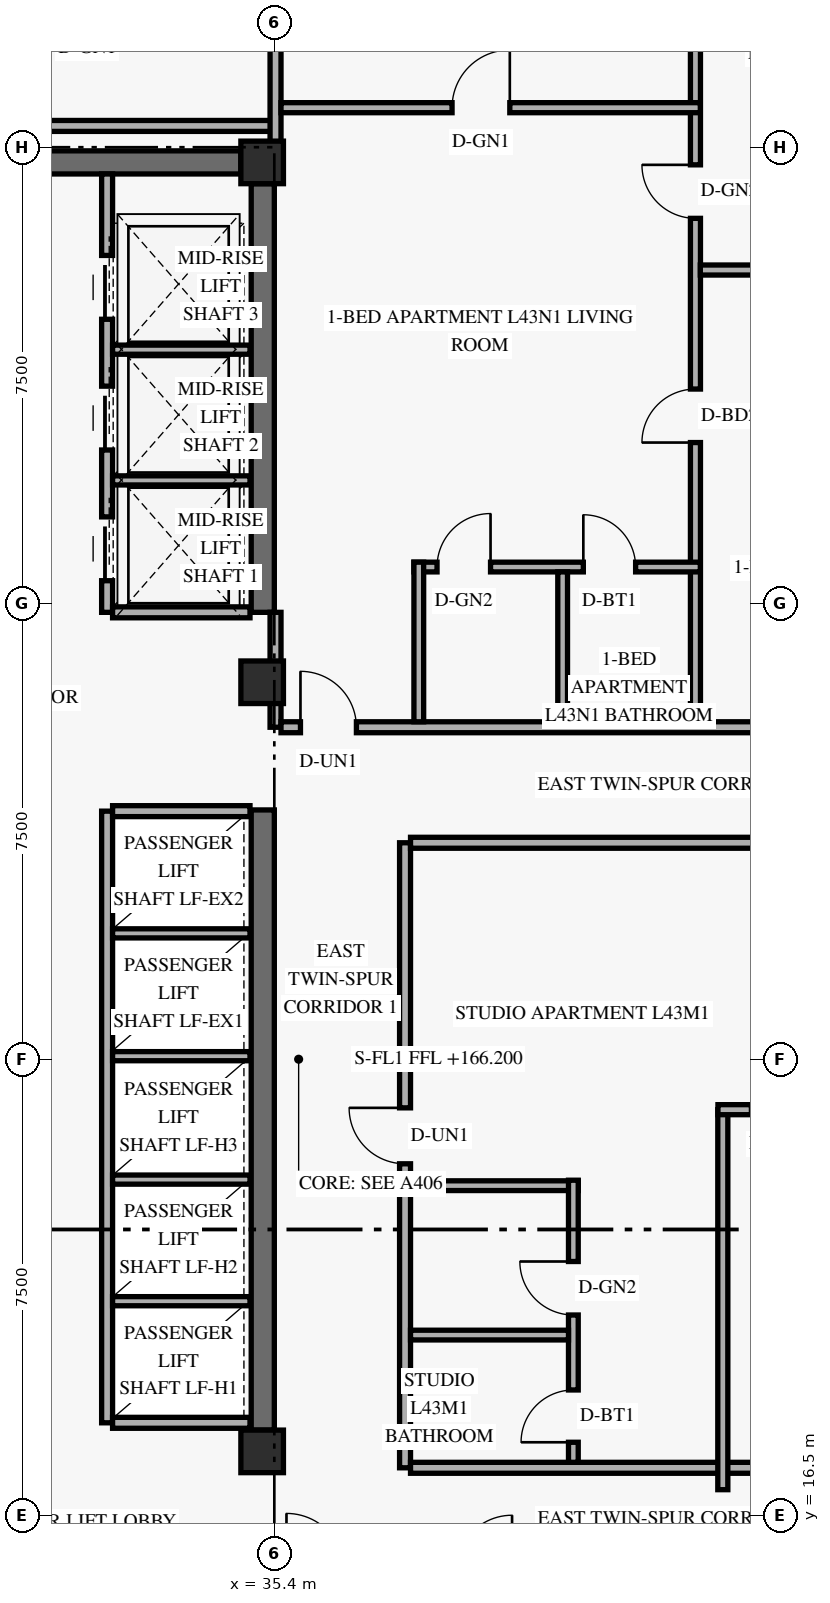
"""IFC4 building model, lengths in metres.
Left out: names, types, materials, properties, quantities, classifications, styles, units other than length and angle.
Written with IfcOpenShell. Run it as: python <this file> out.ifc"""

import sys

from ifc_helpers import new_model, si_unit, direction, frame, frame_2d, origin, origin_2d, place, context, subcontext, project, spatial, rectangle, extrude, element, fill, save


model = new_model("IFC4")
c1 = context("Model", 3, precision=1e-05, world=origin(), true_north=direction((0.0, 1.0)))
c2 = subcontext(c1, "Body", "Model", "MODEL_VIEW")
j1 = project(units=[si_unit("LENGTHUNIT", "METRE"), si_unit("PLANEANGLEUNIT", "RADIAN")], contexts=[c1])
p1 = place(None, origin())
s1 = spatial("IfcSite", under=j1, at=p1, CompositionType="ELEMENT")
p2 = place(p1, origin())
s2 = spatial("IfcBuilding", under=s1, at=p2, CompositionType="ELEMENT")
p3 = place(p2, frame((0.0, 0.0, 166.2)))
s3 = spatial("IfcBuildingStorey", under=s2, at=p3, CompositionType="ELEMENT", Elevation=166.2)
p4 = place(p3, frame((35.21, 17.9, 0.0), z_axis=(0.0, 0.0, 1.0), x_axis=(0.0, 1.0, 0.0)))
e1 = element("IfcWall", 1, at=p4, inside=s3, PredefinedType="SHEAR", context=c2, shape_type="SweptSolid", body=[
    extrude(rectangle(XDim=10.2, YDim=0.38, at=frame_2d((5.1, 0.0))), origin(), (0.0, 0.0, 1.0), 2.748),
])
p5 = place(p3, frame((35.21, 31.35, 0.0), z_axis=(0.0, 0.0, 1.0), x_axis=(0.0, 1.0, 0.0)))
e2 = element("IfcWall", 2, at=p5, inside=s3, PredefinedType="SHEAR", context=c2, shape_type="SweptSolid", body=[
    extrude(rectangle(XDim=7.05, YDim=0.38, at=frame_2d((3.525, 0.0))), origin(), (0.0, 0.0, 1.0), 2.748),
])
p6 = place(p3, frame((24.55, 38.75, 0.0), z_axis=(0.0, 0.0, 1.0), x_axis=(1.0, 0.0, 0.0)))
e3 = element("IfcWall", 3, at=p6, inside=s3, PredefinedType="SHEAR", context=c2, shape_type="SweptSolid", body=[
    extrude(rectangle(XDim=10.3, YDim=0.38, at=frame_2d((5.15, 0.0))), origin(), (0.0, 0.0, 1.0), 3.36),
])
p7 = place(p6, frame((5.2, 0.0, 0.0)))
e4 = element("IfcOpeningElement", 4, at=p7, cuts=e3, PredefinedType="OPENING", context=c2, shape_type="SweptSolid", body=[
    extrude(rectangle(XDim=1.05, YDim=2.15, at=frame_2d((0.525, 1.075))), frame((0.0, 0.2, 0.0), z_axis=(0.0, -1.0, 0.0), x_axis=(1.0, 0.0, 0.0)), (0.0, 0.0, 1.0), 0.4),
])
for number, where, z_axis, x_axis in (
    (5, (35.2, 17.55, 0.0), (0.0, 0.0, 1.0), (1.0, 0.0, 0.0)),
    (6, (35.2, 30.2, 0.0), (0.0, 0.0, 1.0), (1.0, 0.0, 0.0)),
    (7, (35.2, 38.75, 0.0), (0.0, 0.0, 1.0), (1.0, 0.0, 0.0)),
):
    element("IfcColumn", number, at=place(p3, frame(where, z_axis=z_axis, x_axis=x_axis)), inside=s3, PredefinedType="COLUMN", context=c2, shape_type="SweptSolid", body=[
        extrude(rectangle(XDim=0.7, YDim=0.7, at=origin_2d()), origin(), (0.0, 0.0, 1.0), 3.6),
    ])
p8 = place(p3, frame((32.65, 18.02, 0.0), z_axis=(0.0, 0.0, 1.0), x_axis=(0.0, 1.0, 0.0)))
e8 = element("IfcWall", 8, at=p8, inside=s3, PredefinedType="STANDARD", context=c2, shape_type="SweptSolid", body=[
    extrude(rectangle(XDim=10.06, YDim=0.18, at=frame_2d((5.03, 0.0))), origin(), (0.0, 0.0, 1.0), 3.36),
])
for number, where, z_axis, x_axis in (
    (9, (32.74, 18.02, 0.0), (0.0, 0.0, 1.0), (1.0, 0.0, 0.0)),
    (10, (32.74, 28.08, 0.0), (0.0, 0.0, 1.0), (1.0, 0.0, 0.0)),
):
    element("IfcWall", number, at=place(p3, frame(where, z_axis=z_axis, x_axis=x_axis)), inside=s3, PredefinedType="STANDARD", context=c2, shape_type="SweptSolid", body=[
        extrude(rectangle(XDim=2.26, YDim=0.18, at=frame_2d((1.13, 0.0))), origin(), (0.0, 0.0, 1.0), 3.36),
    ])
for number, where, z_axis, x_axis in (
    (11, (32.74, 20.02, 0.0), (0.0, 0.0, 1.0), (1.0, 0.0, 0.0)),
    (12, (32.74, 22.02, 0.0), (0.0, 0.0, 1.0), (1.0, 0.0, 0.0)),
    (13, (32.74, 24.05, 0.0), (0.0, 0.0, 1.0), (1.0, 0.0, 0.0)),
    (14, (32.74, 26.07, 0.0), (0.0, 0.0, 1.0), (1.0, 0.0, 0.0)),
):
    element("IfcWall", number, at=place(p3, frame(where, z_axis=z_axis, x_axis=x_axis)), inside=s3, PredefinedType="STANDARD", context=c2, shape_type="SweptSolid", body=[
        extrude(rectangle(XDim=2.26, YDim=0.15, at=frame_2d((1.13, 0.0))), origin(), (0.0, 0.0, 1.0), 3.36),
    ])
p9 = place(p3, frame((32.65, 31.35, 0.0), z_axis=(0.0, 0.0, 1.0), x_axis=(0.0, 1.0, 0.0)))
e15 = element("IfcWall", 15, at=p9, inside=s3, PredefinedType="STANDARD", context=c2, shape_type="SweptSolid", body=[
    extrude(rectangle(XDim=7.21, YDim=0.18, at=frame_2d((3.605, 0.0))), origin(), (0.0, 0.0, 1.0), 3.36),
])
p10 = place(p9, frame((0.52, 0.0, 0.0)))
e16 = element("IfcOpeningElement", 16, at=p10, cuts=e15, PredefinedType="OPENING", context=c2, shape_type="SweptSolid", body=[
    extrude(rectangle(XDim=1.05, YDim=2.2, at=frame_2d((0.525, 1.1))), frame((0.0, 0.1, 0.0), z_axis=(0.0, -1.0, 0.0), x_axis=(1.0, 0.0, 0.0)), (0.0, 0.0, 1.0), 0.2),
])
p11 = place(p9, frame((2.67, 0.0, 0.0)))
e17 = element("IfcOpeningElement", 17, at=p11, cuts=e15, PredefinedType="OPENING", context=c2, shape_type="SweptSolid", body=[
    extrude(rectangle(XDim=1.05, YDim=2.2, at=frame_2d((0.525, 1.1))), frame((0.0, 0.1, 0.0), z_axis=(0.0, -1.0, 0.0), x_axis=(1.0, 0.0, 0.0)), (0.0, 0.0, 1.0), 0.2),
])
p12 = place(p9, frame((4.82, 0.0, 0.0)))
e18 = element("IfcOpeningElement", 18, at=p12, cuts=e15, PredefinedType="OPENING", context=c2, shape_type="SweptSolid", body=[
    extrude(rectangle(XDim=1.05, YDim=2.2, at=frame_2d((0.525, 1.1))), frame((0.0, 0.1, 0.0), z_axis=(0.0, -1.0, 0.0), x_axis=(1.0, 0.0, 0.0)), (0.0, 0.0, 1.0), 0.2),
])
p13 = place(p3, frame((32.74, 31.35, 0.0), z_axis=(0.0, 0.0, 1.0), x_axis=(1.0, 0.0, 0.0)))
e19 = element("IfcWall", 19, at=p13, inside=s3, PredefinedType="STANDARD", context=c2, shape_type="SweptSolid", body=[
    extrude(rectangle(XDim=2.26, YDim=0.18, at=frame_2d((1.13, 0.0))), origin(), (0.0, 0.0, 1.0), 3.36),
])
for number, where, z_axis, x_axis in (
    (20, (32.74, 33.52, 0.0), (0.0, 0.0, 1.0), (1.0, 0.0, 0.0)),
    (21, (32.74, 35.67, 0.0), (0.0, 0.0, 1.0), (1.0, 0.0, 0.0)),
):
    element("IfcWall", number, at=place(p3, frame(where, z_axis=z_axis, x_axis=x_axis)), inside=s3, PredefinedType="STANDARD", context=c2, shape_type="SweptSolid", body=[
        extrude(rectangle(XDim=2.26, YDim=0.15, at=frame_2d((1.13, 0.0))), origin(), (0.0, 0.0, 1.0), 3.36),
    ])
p14 = place(p3, frame((37.55, 17.28, 0.0), z_axis=(0.0, 0.0, 1.0), x_axis=(0.0, 1.0, 0.0)))
e22 = element("IfcWall", 22, at=p14, inside=s3, PredefinedType="STANDARD", context=c2, shape_type="SweptSolid", body=[
    extrude(rectangle(XDim=10.28, YDim=0.18, at=frame_2d((5.14, 0.0))), origin(), (0.0, 0.0, 1.0), 2.73),
])
p15 = place(p14, frame((5.0, 0.0, 0.0)))
e23 = element("IfcOpeningElement", 23, at=p15, cuts=e22, PredefinedType="OPENING", context=c2, shape_type="SweptSolid", body=[
    extrude(rectangle(XDim=0.92, YDim=2.15, at=frame_2d((0.46, 1.075))), frame((0.0, 0.1, 0.0), z_axis=(0.0, -1.0, 0.0), x_axis=(1.0, 0.0, 0.0)), (0.0, 0.0, 1.0), 0.2),
])
for number, where, z_axis, x_axis in (
    (24, (37.64, 17.28, 0.0), (0.0, 0.0, 1.0), (1.0, 0.0, 0.0)),
    (25, (37.64, 27.56, 0.0), (0.0, 0.0, 1.0), (1.0, 0.0, 0.0)),
):
    element("IfcWall", number, at=place(p3, frame(where, z_axis=z_axis, x_axis=x_axis)), inside=s3, PredefinedType="STANDARD", context=c2, shape_type="SweptSolid", body=[
        extrude(rectangle(XDim=8.826, YDim=0.18, at=frame_2d((4.413, 0.0))), origin(), (0.0, 0.0, 1.0), 2.73),
    ])
p16 = place(p3, frame((35.42, 29.46, 0.0), z_axis=(0.0, 0.0, 1.0), x_axis=(0.0, 1.0, 0.0)))
e26 = element("IfcWall", 26, at=p16, inside=s3, PredefinedType="STANDARD", context=c2, shape_type="SweptSolid", body=[
    extrude(rectangle(XDim=1.89, YDim=0.18, at=frame_2d((0.945, 0.0))), origin(), (0.0, 0.0, 1.0), 2.73),
])
p17 = place(p3, frame((35.51, 29.46, 0.0), z_axis=(0.0, 0.0, 1.0), x_axis=(1.0, 0.0, 0.0)))
e27 = element("IfcWall", 27, at=p17, inside=s3, PredefinedType="STANDARD", context=c2, shape_type="SweptSolid", body=[
    extrude(rectangle(XDim=10.956, YDim=0.18, at=frame_2d((5.478, 0.0))), origin(), (0.0, 0.0, 1.0), 2.73),
])
p18 = place(p17, frame((0.32, 0.0, 0.0)))
e28 = element("IfcOpeningElement", 28, at=p18, cuts=e27, PredefinedType="OPENING", context=c2, shape_type="SweptSolid", body=[
    extrude(rectangle(XDim=0.92, YDim=2.15, at=frame_2d((0.46, 1.075))), frame((0.0, 0.1, 0.0), z_axis=(0.0, -1.0, 0.0), x_axis=(1.0, 0.0, 0.0)), (0.0, 0.0, 1.0), 0.2),
])
p19 = place(p3, frame((23.85, 39.35, 0.0), z_axis=(0.0, 0.0, 1.0), x_axis=(1.0, 0.0, 0.0)))
e29 = element("IfcWall", 29, at=p19, inside=s3, PredefinedType="STANDARD", context=c2, shape_type="SweptSolid", body=[
    extrude(rectangle(XDim=11.57, YDim=0.18, at=frame_2d((5.785, 0.0))), origin(), (0.0, 0.0, 1.0), 2.73),
])
p20 = place(p3, frame((35.42, 38.75, 0.0), z_axis=(0.0, 0.0, 1.0), x_axis=(0.0, 1.0, 0.0)))
e30 = element("IfcWall", 30, at=p20, inside=s3, PredefinedType="PARTITIONING", context=c2, shape_type="SweptSolid", body=[
    extrude(rectangle(XDim=4.97, YDim=0.18, at=frame_2d((2.485, 0.0))), origin(), (0.0, 0.0, 1.0), 2.73),
])
p21 = place(p3, frame((42.326, 29.55, 0.0), z_axis=(0.0, 0.0, 1.0), x_axis=(0.0, 1.0, 0.0)))
e31 = element("IfcWall", 31, at=p21, inside=s3, PredefinedType="PARTITIONING", context=c2, shape_type="SweptSolid", body=[
    extrude(rectangle(XDim=14.17, YDim=0.165, at=frame_2d((7.085, 0.0))), origin(), (0.0, 0.0, 1.0), 2.73),
])
p22 = place(p21, frame((4.593, 0.0, 0.0)))
e32 = element("IfcOpeningElement", 32, at=p22, cuts=e31, PredefinedType="OPENING", context=c2, shape_type="SweptSolid", body=[
    extrude(rectangle(XDim=0.88, YDim=2.14, at=frame_2d((0.44, 1.07))), frame((0.0, 0.093, 0.0), z_axis=(0.0, -1.0, 0.0), x_axis=(1.0, 0.0, 0.0)), (0.0, 0.0, 1.0), 0.185),
])
p23 = place(p21, frame((8.28, 0.0, 0.0)))
e33 = element("IfcOpeningElement", 33, at=p23, cuts=e31, PredefinedType="OPENING", context=c2, shape_type="SweptSolid", body=[
    extrude(rectangle(XDim=0.88, YDim=2.12, at=frame_2d((0.44, 1.06))), frame((0.0, 0.093, 0.0), z_axis=(0.0, -1.0, 0.0), x_axis=(1.0, 0.0, 0.0)), (0.0, 0.0, 1.0), 0.185),
])
p24 = place(p3, frame((37.696, 32.095, 0.0), z_axis=(0.0, 0.0, 1.0), x_axis=(1.0, 0.0, 0.0)))
e34 = element("IfcWall", 34, at=p24, inside=s3, PredefinedType="PLUMBINGWALL", context=c2, shape_type="SweptSolid", body=[
    extrude(rectangle(XDim=4.71, YDim=0.16, at=frame_2d((2.355, 0.0))), origin(), (0.0, 0.0, 1.0), 3.36),
])
p25 = place(p24, frame((0.38, 0.0, 0.0)))
e35 = element("IfcOpeningElement", 35, at=p25, cuts=e34, PredefinedType="OPENING", context=c2, shape_type="SweptSolid", body=[
    extrude(rectangle(XDim=0.88, YDim=2.12, at=frame_2d((0.44, 1.06))), frame((0.0, 0.09, 0.0), z_axis=(0.0, -1.0, 0.0), x_axis=(1.0, 0.0, 0.0)), (0.0, 0.0, 1.0), 0.18),
])
p26 = place(p24, frame((2.786, 0.0, 0.0)))
e36 = element("IfcOpeningElement", 36, at=p26, cuts=e34, PredefinedType="OPENING", context=c2, shape_type="SweptSolid", body=[
    extrude(rectangle(XDim=0.86, YDim=2.12, at=frame_2d((0.43, 1.06))), frame((0.0, 0.09, 0.0), z_axis=(0.0, -1.0, 0.0), x_axis=(1.0, 0.0, 0.0)), (0.0, 0.0, 1.0), 0.18),
])
p27 = place(p3, frame((37.776, 29.55, 0.0), z_axis=(0.0, 0.0, 1.0), x_axis=(0.0, 1.0, 0.0)))
e37 = element("IfcWall", 37, at=p27, inside=s3, PredefinedType="PLUMBINGWALL", context=c2, shape_type="SweptSolid", body=[
    extrude(rectangle(XDim=2.625, YDim=0.16, at=frame_2d((1.312, 0.0))), origin(), (0.0, 0.0, 1.0), 2.73),
])
p28 = place(p3, frame((40.142, 29.55, 0.0), z_axis=(0.0, 0.0, 1.0), x_axis=(0.0, 1.0, 0.0)))
e38 = element("IfcWall", 38, at=p28, inside=s3, PredefinedType="PLUMBINGWALL", context=c2, shape_type="SweptSolid", body=[
    extrude(rectangle(XDim=2.465, YDim=0.16, at=frame_2d((1.232, 0.0))), origin(), (0.0, 0.0, 1.0), 2.73),
])
p29 = place(p3, frame((35.51, 39.65, 0.0), z_axis=(0.0, 0.0, 1.0), x_axis=(1.0, 0.0, 0.0)))
e39 = element("IfcWall", 39, at=p29, inside=s3, PredefinedType="PARTITIONING", context=c2, shape_type="SweptSolid", body=[
    extrude(rectangle(XDim=6.896, YDim=0.165, at=frame_2d((3.448, 0.0))), origin(), (0.0, 0.0, 1.0), 3.36),
])
p30 = place(p29, frame((2.813, 0.0, 0.0)))
e40 = element("IfcOpeningElement", 40, at=p30, cuts=e39, PredefinedType="OPENING", context=c2, shape_type="SweptSolid", body=[
    extrude(rectangle(XDim=0.95, YDim=2.15, at=frame_2d((0.475, 1.075))), frame((0.0, 0.093, 0.0), z_axis=(0.0, -1.0, 0.0), x_axis=(1.0, 0.0, 0.0)), (0.0, 0.0, 1.0), 0.185),
])
p31 = place(p3, frame((42.406, 36.98, 0.0), z_axis=(0.0, 0.0, 1.0), x_axis=(1.0, 0.0, 0.0)))
e41 = element("IfcWall", 41, at=p31, inside=s3, PredefinedType="PARTITIONING", context=c2, shape_type="SweptSolid", body=[
    extrude(rectangle(XDim=3.97, YDim=0.165, at=frame_2d((1.985, 0.0))), origin(), (0.0, 0.0, 1.0), 2.73),
])
p32 = place(p3, frame((37.64, 21.92, 0.0), z_axis=(0.0, 0.0, 1.0), x_axis=(1.0, 0.0, 0.0)))
e42 = element("IfcWall", 42, at=p32, inside=s3, PredefinedType="PLUMBINGWALL", context=c2, shape_type="SweptSolid", body=[
    extrude(rectangle(XDim=2.758, YDim=0.16, at=frame_2d((1.379, 0.0))), origin(), (0.0, 0.0, 1.0), 2.73),
])
p33 = place(p3, frame((40.318, 17.37, 0.0), z_axis=(0.0, 0.0, 1.0), x_axis=(0.0, 1.0, 0.0)))
e43 = element("IfcWall", 43, at=p33, inside=s3, PredefinedType="PLUMBINGWALL", context=c2, shape_type="SweptSolid", body=[
    extrude(rectangle(XDim=4.64, YDim=0.16, at=frame_2d((2.32, 0.0))), origin(), (0.0, 0.0, 1.0), 2.73),
])
p34 = place(p33, frame((0.33, 0.0, 0.0)))
e44 = element("IfcOpeningElement", 44, at=p34, cuts=e43, PredefinedType="OPENING", context=c2, shape_type="SweptSolid", body=[
    extrude(rectangle(XDim=0.86, YDim=2.12, at=frame_2d((0.43, 1.06))), frame((0.0, 0.09, 0.0), z_axis=(0.0, -1.0, 0.0), x_axis=(1.0, 0.0, 0.0)), (0.0, 0.0, 1.0), 0.18),
])
p35 = place(p33, frame((2.423, 0.0, 0.0)))
e45 = element("IfcOpeningElement", 45, at=p35, cuts=e43, PredefinedType="OPENING", context=c2, shape_type="SweptSolid", body=[
    extrude(rectangle(XDim=0.88, YDim=2.12, at=frame_2d((0.44, 1.06))), frame((0.0, 0.09, 0.0), z_axis=(0.0, -1.0, 0.0), x_axis=(1.0, 0.0, 0.0)), (0.0, 0.0, 1.0), 0.18),
])
p36 = place(p3, frame((37.64, 19.463, 0.0), z_axis=(0.0, 0.0, 1.0), x_axis=(1.0, 0.0, 0.0)))
e46 = element("IfcWall", 46, at=p36, inside=s3, PredefinedType="PLUMBINGWALL", context=c2, shape_type="SweptSolid", body=[
    extrude(rectangle(XDim=2.598, YDim=0.16, at=frame_2d((1.299, 0.0))), origin(), (0.0, 0.0, 1.0), 3.36),
])
p37 = place(p3, frame((42.776, 16.92, 0.0), z_axis=(0.0, 0.0, 1.0), x_axis=(0.0, 1.0, 0.0)))
e47 = element("IfcWall", 47, at=p37, inside=s3, PredefinedType="PARTITIONING", context=c2, shape_type="SweptSolid", body=[
    extrude(rectangle(XDim=6.25, YDim=0.165, at=frame_2d((3.125, 0.0))), origin(), (0.0, 0.0, 1.0), 2.73),
])
p38 = place(p3, frame((42.696, 23.17, 0.0), z_axis=(0.0, 0.0, 1.0), x_axis=(1.0, 0.0, 0.0)))
e48 = element("IfcWall", 48, at=p38, inside=s3, PredefinedType="PARTITIONING", context=c2, shape_type="SweptSolid", body=[
    extrude(rectangle(XDim=4.13, YDim=0.165, at=frame_2d((2.065, 0.0))), origin(), (0.0, 0.0, 1.0), 2.73),
])
p39 = place(p38, frame((0.55, 0.0, 0.0)))
e49 = element("IfcOpeningElement", 49, at=p39, cuts=e48, PredefinedType="OPENING", context=c2, shape_type="SweptSolid", body=[
    extrude(rectangle(XDim=0.88, YDim=2.12, at=frame_2d((0.44, 1.06))), frame((0.0, 0.093, 0.0), z_axis=(0.0, -1.0, 0.0), x_axis=(1.0, 0.0, 0.0)), (0.0, 0.0, 1.0), 0.185),
])
p40 = place(p10, origin())
e50 = element("IfcDoor", 50, at=p40, inside=s3, OperationType="SLIDING_TO_LEFT", PredefinedType="DOOR", context=c2, shape_type="SweptSolid", body=[
    extrude(rectangle(XDim=1.05, YDim=2.2, at=frame_2d((0.525, 1.1))), frame((0.0, 0.025, 0.0), z_axis=(0.0, -1.0, 0.0), x_axis=(1.0, 0.0, 0.0)), (0.0, 0.0, 1.0), 0.05),
])
fill(e16, e50)
p41 = place(p11, origin())
e51 = element("IfcDoor", 51, at=p41, inside=s3, OperationType="SLIDING_TO_LEFT", PredefinedType="DOOR", context=c2, shape_type="SweptSolid", body=[
    extrude(rectangle(XDim=1.05, YDim=2.2, at=frame_2d((0.525, 1.1))), frame((0.0, 0.025, 0.0), z_axis=(0.0, -1.0, 0.0), x_axis=(1.0, 0.0, 0.0)), (0.0, 0.0, 1.0), 0.05),
])
fill(e17, e51)
p42 = place(p12, origin())
e52 = element("IfcDoor", 52, at=p42, inside=s3, OperationType="SLIDING_TO_LEFT", PredefinedType="DOOR", context=c2, shape_type="SweptSolid", body=[
    extrude(rectangle(XDim=1.05, YDim=2.2, at=frame_2d((0.525, 1.1))), frame((0.0, 0.025, 0.0), z_axis=(0.0, -1.0, 0.0), x_axis=(1.0, 0.0, 0.0)), (0.0, 0.0, 1.0), 0.05),
])
fill(e18, e52)
p43 = place(p30, origin())
e53 = element("IfcDoor", 53, at=p43, inside=s3, OperationType="SINGLE_SWING_RIGHT", PredefinedType="DOOR", context=c2, shape_type="SweptSolid", body=[
    extrude(rectangle(XDim=0.95, YDim=2.15, at=frame_2d((0.475, 1.075))), frame((0.0, 0.025, 0.0), z_axis=(0.0, -1.0, 0.0), x_axis=(1.0, 0.0, 0.0)), (0.0, 0.0, 1.0), 0.05),
])
fill(e40, e53)
p44 = place(p18, origin())
e54 = element("IfcDoor", 54, at=p44, inside=s3, OperationType="SINGLE_SWING_LEFT", PredefinedType="DOOR", context=c2, shape_type="SweptSolid", body=[
    extrude(rectangle(XDim=0.92, YDim=2.15, at=frame_2d((0.46, 1.075))), frame((0.0, 0.025, 0.0), z_axis=(0.0, -1.0, 0.0), x_axis=(1.0, 0.0, 0.0)), (0.0, 0.0, 1.0), 0.05),
])
fill(e28, e54)
p45 = place(p25, origin())
e55 = element("IfcDoor", 55, at=p45, inside=s3, OperationType="SINGLE_SWING_RIGHT", PredefinedType="DOOR", context=c2, shape_type="SweptSolid", body=[
    extrude(rectangle(XDim=0.88, YDim=2.12, at=frame_2d((0.44, 1.06))), frame((0.0, 0.025, 0.0), z_axis=(0.0, -1.0, 0.0), x_axis=(1.0, 0.0, 0.0)), (0.0, 0.0, 1.0), 0.05),
])
fill(e35, e55)
p46 = place(p26, origin())
e56 = element("IfcDoor", 56, at=p46, inside=s3, OperationType="SINGLE_SWING_LEFT", PredefinedType="DOOR", context=c2, shape_type="SweptSolid", body=[
    extrude(rectangle(XDim=0.86, YDim=2.12, at=frame_2d((0.43, 1.06))), frame((0.0, 0.025, 0.0), z_axis=(0.0, -1.0, 0.0), x_axis=(1.0, 0.0, 0.0)), (0.0, 0.0, 1.0), 0.05),
])
fill(e36, e56)
p47 = place(p22, origin())
e57 = element("IfcDoor", 57, at=p47, inside=s3, OperationType="SINGLE_SWING_LEFT", PredefinedType="DOOR", context=c2, shape_type="SweptSolid", body=[
    extrude(rectangle(XDim=0.88, YDim=2.14, at=frame_2d((0.44, 1.07))), frame((0.0, 0.025, 0.0), z_axis=(0.0, -1.0, 0.0), x_axis=(1.0, 0.0, 0.0)), (0.0, 0.0, 1.0), 0.05),
])
fill(e32, e57)
p48 = place(p23, origin())
e58 = element("IfcDoor", 58, at=p48, inside=s3, OperationType="SINGLE_SWING_RIGHT", PredefinedType="DOOR", context=c2, shape_type="SweptSolid", body=[
    extrude(rectangle(XDim=0.88, YDim=2.12, at=frame_2d((0.44, 1.06))), frame((0.0, 0.025, 0.0), z_axis=(0.0, -1.0, 0.0), x_axis=(1.0, 0.0, 0.0)), (0.0, 0.0, 1.0), 0.05),
])
fill(e33, e58)
p49 = place(p15, origin())
e59 = element("IfcDoor", 59, at=p49, inside=s3, OperationType="SINGLE_SWING_RIGHT", PredefinedType="DOOR", context=c2, shape_type="SweptSolid", body=[
    extrude(rectangle(XDim=0.92, YDim=2.15, at=frame_2d((0.46, 1.075))), frame((0.0, 0.025, 0.0), z_axis=(0.0, -1.0, 0.0), x_axis=(1.0, 0.0, 0.0)), (0.0, 0.0, 1.0), 0.05),
])
fill(e23, e59)
p50 = place(p34, origin())
e60 = element("IfcDoor", 60, at=p50, inside=s3, OperationType="SINGLE_SWING_LEFT", PredefinedType="DOOR", context=c2, shape_type="SweptSolid", body=[
    extrude(rectangle(XDim=0.86, YDim=2.12, at=frame_2d((0.43, 1.06))), frame((0.0, 0.025, 0.0), z_axis=(0.0, -1.0, 0.0), x_axis=(1.0, 0.0, 0.0)), (0.0, 0.0, 1.0), 0.05),
])
fill(e44, e60)
p51 = place(p35, origin())
e61 = element("IfcDoor", 61, at=p51, inside=s3, OperationType="SINGLE_SWING_RIGHT", PredefinedType="DOOR", context=c2, shape_type="SweptSolid", body=[
    extrude(rectangle(XDim=0.88, YDim=2.12, at=frame_2d((0.44, 1.06))), frame((0.0, 0.025, 0.0), z_axis=(0.0, -1.0, 0.0), x_axis=(1.0, 0.0, 0.0)), (0.0, 0.0, 1.0), 0.05),
])
fill(e45, e61)
save(model, sys.argv[1])
